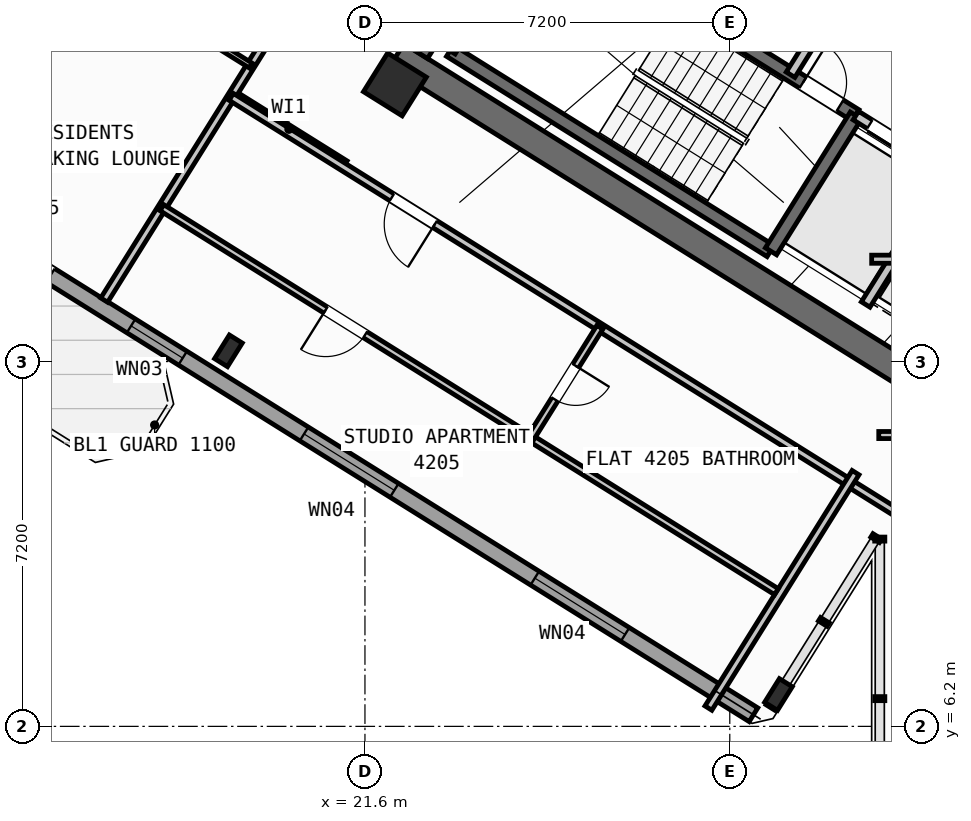
"""IFC4 building model, lengths in metres.
Left out: names, types, materials, properties, quantities, classifications, styles, units other than length and angle.
Written with IfcOpenShell. Run it as: python <this file> out.ifc"""

import sys

from ifc_helpers import new_model, si_unit, direction, frame, frame_2d, origin, origin_2d, place, context, subcontext, project, spatial, rectangle, hollow_rectangle, i_section, extrude, source, transform, mapped, element, fill, save


model = new_model("IFC4")
c1 = context("Model", 3, precision=1e-05, world=origin(), true_north=direction((0.0, 1.0)))
c2 = subcontext(c1, "Body", "Model", "MODEL_VIEW")
j1 = project(units=[si_unit("LENGTHUNIT", "METRE"), si_unit("PLANEANGLEUNIT", "RADIAN")], contexts=[c1])
p1 = place(None, origin())
s1 = spatial("IfcSite", under=j1, at=p1, CompositionType="ELEMENT")
p2 = place(p1, origin())
s2 = spatial("IfcBuilding", under=s1, at=p2, CompositionType="ELEMENT")
p3 = place(p2, frame((0.0, 0.0, 165.9)))
s3 = spatial("IfcBuildingStorey", under=s2, at=p3, CompositionType="ELEMENT", Elevation=165.9)
p4 = place(p3, frame((33.366, 12.477, 0.0), z_axis=(0.0, 0.0, 1.0), x_axis=(-0.848047359947, 0.529920442413, 0.0)))
e1 = element("IfcWall", 1, at=p4, inside=s3, PredefinedType="SHEAR", context=c2, shape_type="SweptSolid", body=[
    extrude(rectangle(XDim=13.14, YDim=0.55, at=frame_2d((6.57, 0.0))), origin(), (0.0, 0.0, 1.0), 3.32),
])
p5 = place(p3, frame((26.007, 24.976, 0.0), z_axis=(0.0, 0.0, 1.0), x_axis=(-0.529923795287, -0.848045264823, 0.0)))
e2 = element("IfcWall", 2, at=p5, inside=s3, PredefinedType="SHEAR", context=c2, shape_type="SweptSolid", body=[
    extrude(rectangle(XDim=6.425, YDim=0.55, at=frame_2d((3.212, 0.0))), origin(), (0.0, 0.0, 1.0), 3.32),
])
m1 = source(origin(), c2, "Body", "SweptSolid", [
    extrude(i_section(OverallWidth=0.3, OverallDepth=0.55, WebThickness=0.015, FlangeThickness=0.029, at=origin_2d()), origin(), (0.0, 0.0, 1.0), 3.6),
])
p6 = place(p3, frame((29.761, 6.829, 0.0), z_axis=(0.0, 0.0, 1.0), x_axis=(-0.848048096156, 0.529919264233, 0.0)))
e3 = element("IfcColumn", 3, at=p6, inside=s3, PredefinedType="COLUMN", context=c2, shape_type="MappedRepresentation", body=[
    mapped(m1, transform((0.0, 0.0, 0.0), scale=1.0)),
])
m2 = source(origin(), c2, "Body", "SweptSolid", [
    extrude(hollow_rectangle(XDim=0.9, YDim=0.9, WallThickness=0.036, at=origin_2d()), origin(), (0.0, 0.0, 1.0), 3.6),
])
p7 = place(p3, frame((22.191, 18.87, 0.0), z_axis=(0.0, 0.0, 1.0), x_axis=(-0.848048096156, 0.529919264233, 0.0)))
e4 = element("IfcColumn", 4, at=p7, inside=s3, PredefinedType="COLUMN", context=c2, shape_type="MappedRepresentation", body=[
    mapped(m2, transform((0.0, 0.0, 0.0), scale=1.0)),
])
p8 = place(p3, frame((18.906, 13.612, 0.0), z_axis=(0.0, 0.0, 1.0), x_axis=(-0.848048096156, 0.529919264233, 0.0)))
e5 = element("IfcColumn", 5, at=p8, inside=s3, PredefinedType="COLUMN", context=c2, shape_type="MappedRepresentation", body=[
    mapped(m1, transform((0.0, 0.0, 0.0), scale=1.0)),
])
p9 = place(p3, frame((29.268, 6.429, 0.0), z_axis=(0.0, 0.0, 1.0), x_axis=(-0.848049971435, 0.529916263149, 0.0)))
e6 = element("IfcWall", 6, at=p9, inside=s3, PredefinedType="STANDARD", context=c2, shape_type="SweptSolid", body=[
    extrude(rectangle(XDim=31.588, YDim=0.32, at=frame_2d((15.794, 0.0))), origin(), (0.0, 0.0, 1.0), 3.32),
])
p10 = place(p9, frame((16.362, 0.0, 0.0)))
e7 = element("IfcOpeningElement", 7, at=p10, cuts=e6, PredefinedType="OPENING", context=c2, shape_type="SweptSolid", body=[
    extrude(rectangle(XDim=1.2, YDim=2.15, at=frame_2d((0.6, 1.075))), frame((0.0, 0.17, 0.0), z_axis=(0.0, -1.0, 0.0), x_axis=(1.0, 0.0, 0.0)), (0.0, 0.0, 1.0), 0.34),
])
p11 = place(p9, frame((2.989, 0.0, 0.8)))
e8 = element("IfcOpeningElement", 8, at=p11, cuts=e6, PredefinedType="OPENING", context=c2, shape_type="SweptSolid", body=[
    extrude(rectangle(XDim=2.1, YDim=1.55, at=frame_2d((1.05, 0.775))), frame((0.0, 0.17, 0.0), z_axis=(0.0, -1.0, 0.0), x_axis=(1.0, 0.0, 0.0)), (0.0, 0.0, 1.0), 0.34),
])
p12 = place(p9, frame((8.359, 0.0, 0.8)))
e9 = element("IfcOpeningElement", 9, at=p12, cuts=e6, PredefinedType="OPENING", context=c2, shape_type="SweptSolid", body=[
    extrude(rectangle(XDim=2.1, YDim=1.55, at=frame_2d((1.05, 0.775))), frame((0.0, 0.17, 0.0), z_axis=(0.0, -1.0, 0.0), x_axis=(1.0, 0.0, 0.0)), (0.0, 0.0, 1.0), 0.34),
])
p13 = place(p9, frame((13.284, 0.0, 0.95)))
e10 = element("IfcOpeningElement", 10, at=p13, cuts=e6, PredefinedType="OPENING", context=c2, shape_type="SweptSolid", body=[
    extrude(rectangle(XDim=1.2, YDim=1.4, at=frame_2d((0.6, 0.7))), frame((0.0, 0.17, 0.0), z_axis=(0.0, -1.0, 0.0), x_axis=(1.0, 0.0, 0.0)), (0.0, 0.0, 1.0), 0.34),
])
p14 = place(p9, frame((20.39, 0.0, 0.95)))
e11 = element("IfcOpeningElement", 11, at=p14, cuts=e6, PredefinedType="OPENING", context=c2, shape_type="SweptSolid", body=[
    extrude(rectangle(XDim=1.2, YDim=1.4, at=frame_2d((0.6, 0.7))), frame((0.0, 0.17, 0.0), z_axis=(0.0, -1.0, 0.0), x_axis=(1.0, 0.0, 0.0)), (0.0, 0.0, 1.0), 0.34),
])
p15 = place(p9, frame((23.715, 0.0, 1.0)))
e12 = element("IfcOpeningElement", 12, at=p15, cuts=e6, PredefinedType="OPENING", context=c2, shape_type="SweptSolid", body=[
    extrude(rectangle(XDim=0.9, YDim=1.25, at=frame_2d((0.45, 0.625))), frame((0.0, 0.17, 0.0), z_axis=(0.0, -1.0, 0.0), x_axis=(1.0, 0.0, 0.0)), (0.0, 0.0, 1.0), 0.34),
])
p16 = place(p9, frame((26.106, 0.0, 0.85)))
e13 = element("IfcOpeningElement", 13, at=p16, cuts=e6, PredefinedType="OPENING", context=c2, shape_type="SweptSolid", body=[
    extrude(rectangle(XDim=1.5, YDim=1.5, at=frame_2d((0.75, 0.75))), frame((0.0, 0.17, 0.0), z_axis=(0.0, -1.0, 0.0), x_axis=(1.0, 0.0, 0.0)), (0.0, 0.0, 1.0), 0.34),
])
p17 = place(p9, frame((29.068, 0.0, 0.85)))
e14 = element("IfcOpeningElement", 14, at=p17, cuts=e6, PredefinedType="OPENING", context=c2, shape_type="SweptSolid", body=[
    extrude(rectangle(XDim=1.8, YDim=1.5, at=frame_2d((0.9, 0.75))), frame((0.0, 0.17, 0.0), z_axis=(0.0, -1.0, 0.0), x_axis=(1.0, 0.0, 0.0)), (0.0, 0.0, 1.0), 0.34),
])
p18 = place(p3, frame((29.605, 15.581, 0.0), z_axis=(0.0, 0.0, 1.0), x_axis=(-0.848036911448, 0.529937163087, 0.0)))
e15 = element("IfcWall", 15, at=p18, inside=s3, PredefinedType="SHEAR", context=c2, shape_type="SweptSolid", body=[
    extrude(rectangle(XDim=7.46, YDim=0.26, at=frame_2d((3.73, 0.0))), origin(), (0.0, 0.0, 1.0), 3.32),
])
p19 = place(p3, frame((31.28, 18.261, 0.0), z_axis=(0.0, 0.0, 1.0), x_axis=(-0.848051618787, 0.529913626805, 0.0)))
e16 = element("IfcWall", 16, at=p19, inside=s3, PredefinedType="SHEAR", context=c2, shape_type="SweptSolid", body=[
    extrude(rectangle(XDim=7.46, YDim=0.26, at=frame_2d((3.73, 0.0))), origin(), (0.0, 0.0, 1.0), 3.32),
])
p20 = place(p19, frame((0.36, 0.0, 0.0)))
e17 = element("IfcOpeningElement", 17, at=p20, cuts=e16, PredefinedType="OPENING", context=c2, shape_type="SweptSolid", body=[
    extrude(rectangle(XDim=0.86, YDim=2.05, at=frame_2d((0.43, 1.025))), frame((0.0, 0.14, 0.0), z_axis=(0.0, -1.0, 0.0), x_axis=(1.0, 0.0, 0.0)), (0.0, 0.0, 1.0), 0.28),
])
p21 = place(p3, frame((31.288, 18.256, 0.0), z_axis=(0.0, 0.0, 1.0), x_axis=(-0.529943379326, -0.848033026897, 0.0)))
e18 = element("IfcWall", 18, at=p21, inside=s3, PredefinedType="SHEAR", context=c2, shape_type="SweptSolid", body=[
    extrude(rectangle(XDim=3.16, YDim=0.26, at=frame_2d((1.58, 0.0))), origin(), (0.0, 0.0, 1.0), 3.32),
])
p22 = place(p3, frame((24.945, 22.22, 0.0), z_axis=(0.0, 0.0, 1.0), x_axis=(-0.529908658664, -0.84805472316, 0.0)))
e19 = element("IfcWall", 19, at=p22, inside=s3, PredefinedType="SHEAR", context=c2, shape_type="SweptSolid", body=[
    extrude(rectangle(XDim=3.16, YDim=0.26, at=frame_2d((1.58, 0.0))), origin(), (0.0, 0.0, 1.0), 3.32),
])
p23 = place(p3, frame((34.891, 16.005, 0.0), z_axis=(0.0, 0.0, 1.0), x_axis=(-0.848062873452, 0.529895614884, 0.0)))
e20 = element("IfcWall", 20, at=p23, inside=s3, PredefinedType="STANDARD", context=c2, shape_type="SweptSolid", body=[
    extrude(rectangle(XDim=4.248, YDim=0.2, at=frame_2d((2.124, 0.0))), origin(), (0.0, 0.0, 1.0), 3.31),
])
p24 = place(p23, frame((0.398, 0.0, 0.0)))
e21 = element("IfcOpeningElement", 21, at=p24, cuts=e20, PredefinedType="OPENING", context=c2, shape_type="SweptSolid", body=[
    extrude(rectangle(XDim=1.3, YDim=2.2, at=frame_2d((0.65, 1.1))), frame((0.0, 0.11, 0.0), z_axis=(0.0, -1.0, 0.0), x_axis=(1.0, 0.0, 0.0)), (0.0, 0.0, 1.0), 0.22),
])
p25 = place(p23, frame((2.473, 0.0, 0.0)))
e22 = element("IfcOpeningElement", 22, at=p25, cuts=e20, PredefinedType="OPENING", context=c2, shape_type="SweptSolid", body=[
    extrude(rectangle(XDim=1.45, YDim=2.25, at=frame_2d((0.725, 1.125))), frame((0.0, 0.11, 0.0), z_axis=(0.0, -1.0, 0.0), x_axis=(1.0, 0.0, 0.0)), (0.0, 0.0, 1.0), 0.22),
])
p26 = place(p3, frame((36.417, 18.447, 0.0), z_axis=(0.0, 0.0, 1.0), x_axis=(-0.848064879198, 0.529892404805, 0.0)))
e23 = element("IfcWall", 23, at=p26, inside=s3, PredefinedType="STANDARD", context=c2, shape_type="SweptSolid", body=[
    extrude(rectangle(XDim=5.768, YDim=0.2, at=frame_2d((2.884, 0.0))), origin(), (0.0, 0.0, 1.0), 3.31),
])
p27 = place(p26, frame((2.548, 0.0, 0.0)))
e24 = element("IfcOpeningElement", 24, at=p27, cuts=e23, PredefinedType="OPENING", context=c2, shape_type="SweptSolid", body=[
    extrude(rectangle(XDim=1.15, YDim=2.1, at=frame_2d((0.575, 1.05))), frame((0.0, 0.11, 0.0), z_axis=(0.0, -1.0, 0.0), x_axis=(1.0, 0.0, 0.0)), (0.0, 0.0, 1.0), 0.22),
])
p28 = place(p3, frame((33.029, 17.003, 0.0), z_axis=(0.0, 0.0, 1.0), x_axis=(-0.529916267533, -0.848049968695, 0.0)))
e25 = element("IfcWall", 25, at=p28, inside=s3, PredefinedType="STANDARD", context=c2, shape_type="SweptSolid", body=[
    extrude(rectangle(XDim=2.92, YDim=0.2, at=frame_2d((1.46, 0.0))), origin(), (0.0, 0.0, 1.0), 3.31),
])
p29 = place(p3, frame((31.525, 21.504, 0.0), z_axis=(0.0, 0.0, 1.0), x_axis=(-0.529907497854, -0.848055448493, 0.0)))
e26 = element("IfcWall", 26, at=p29, inside=s3, PredefinedType="STANDARD", context=c2, shape_type="SweptSolid", body=[
    extrude(rectangle(XDim=2.88, YDim=0.2, at=frame_2d((1.44, 0.0))), origin(), (0.0, 0.0, 1.0), 3.31),
])
p30 = place(p3, frame((21.206, 17.292, 0.0), z_axis=(0.0, 0.0, 1.0), x_axis=(-0.848050851465, 0.529914854792, 0.0)))
e27 = element("IfcWall", 27, at=p30, inside=s3, PredefinedType="PARTITIONING", context=c2, shape_type="SweptSolid", body=[
    extrude(rectangle(XDim=2.61, YDim=0.16, at=frame_2d((1.305, 0.0))), origin(), (0.0, 0.0, 1.0), 3.31),
])
p31 = place(p3, frame((23.899, 26.529, 0.0), z_axis=(0.0, 0.0, 1.0), x_axis=(-0.529917716469, -0.848049063305, 0.0)))
e28 = element("IfcWall", 28, at=p31, inside=s3, PredefinedType="PARTITIONING", context=c2, shape_type="SweptSolid", body=[
    extrude(rectangle(XDim=14.05, YDim=0.16, at=frame_2d((7.025, 0.0))), origin(), (0.0, 0.0, 1.0), 3.31),
])
p32 = place(p3, frame((16.519, 21.87, 0.0), z_axis=(0.0, 0.0, 1.0), x_axis=(-0.529922447305, -0.848046107144, 0.0)))
e29 = element("IfcWall", 29, at=p32, inside=s3, PredefinedType="PARTITIONING", context=c2, shape_type="SweptSolid", body=[
    extrude(rectangle(XDim=5.451, YDim=0.16, at=frame_2d((2.726, 0.0))), origin(), (0.0, 0.0, 1.0), 2.795),
])
p33 = place(p3, frame((19.346, 19.242, 0.0), z_axis=(0.0, 0.0, 1.0), x_axis=(-0.848059820872, 0.529900500304, 0.0)))
e30 = element("IfcWall", 30, at=p33, inside=s3, PredefinedType="PARTITIONING", context=c2, shape_type="SweptSolid", body=[
    extrude(rectangle(XDim=3.79, YDim=0.11, at=frame_2d((1.895, 0.0))), origin(), (0.0, 0.0, 1.0), 3.31),
])
p34 = place(p33, frame((1.435, 0.0, 0.0)))
e31 = element("IfcOpeningElement", 31, at=p34, cuts=e30, PredefinedType="OPENING", context=c2, shape_type="SweptSolid", body=[
    extrude(rectangle(XDim=0.92, YDim=2.08, at=frame_2d((0.46, 1.04))), frame((0.0, 0.065, 0.0), z_axis=(0.0, -1.0, 0.0), x_axis=(1.0, 0.0, 0.0)), (0.0, 0.0, 1.0), 0.13),
])
p35 = place(p3, frame((15.953, 28.452, 0.0), z_axis=(0.0, 0.0, 1.0), x_axis=(-0.529931645041, -0.848040359643, 0.0)))
e32 = element("IfcWall", 32, at=p35, inside=s3, PredefinedType="PARTITIONING", context=c2, shape_type="SweptSolid", body=[
    extrude(rectangle(XDim=11.74, YDim=0.11, at=frame_2d((5.87, 0.0))), origin(), (0.0, 0.0, 1.0), 3.31),
])
p36 = place(p35, frame((0.35, 0.0, 0.0)))
e33 = element("IfcOpeningElement", 33, at=p36, cuts=e32, PredefinedType="OPENING", context=c2, shape_type="SweptSolid", body=[
    extrude(rectangle(XDim=0.92, YDim=2.08, at=frame_2d((0.46, 1.04))), frame((0.0, 0.065, 0.0), z_axis=(0.0, -1.0, 0.0), x_axis=(1.0, 0.0, 0.0)), (0.0, 0.0, 1.0), 0.13),
])
p37 = place(p3, frame((32.164, 10.374, 0.0), z_axis=(0.0, 0.0, 1.0), x_axis=(-0.848044107957, 0.529925646633, 0.0)))
e34 = element("IfcWall", 34, at=p37, inside=s3, PredefinedType="PARTITIONING", context=c2, shape_type="SweptSolid", body=[
    extrude(rectangle(XDim=15.57, YDim=0.16, at=frame_2d((7.785, 0.0))), origin(), (0.0, 0.0, 1.0), 3.31),
])
p38 = place(p37, frame((10.83, 0.0, 0.0)))
e35 = element("IfcOpeningElement", 35, at=p38, cuts=e34, PredefinedType="OPENING", context=c2, shape_type="SweptSolid", body=[
    extrude(rectangle(XDim=1.0, YDim=2.1, at=frame_2d((0.5, 1.05))), frame((0.0, 0.09, 0.0), z_axis=(0.0, -1.0, 0.0), x_axis=(1.0, 0.0, 0.0)), (0.0, 0.0, 1.0), 0.18),
])
p39 = place(p3, frame((31.282, 11.208, 0.0), z_axis=(0.0, 0.0, 1.0), x_axis=(-0.529938869374, -0.84803584519, 0.0)))
e36 = element("IfcWall", 36, at=p39, inside=s3, PredefinedType="PARTITIONING", context=c2, shape_type="SweptSolid", body=[
    extrude(rectangle(XDim=5.48, YDim=0.16, at=frame_2d((2.74, 0.0))), origin(), (0.0, 0.0, 1.0), 3.31),
])
p40 = place(p3, frame((29.72, 8.859, 0.0), z_axis=(0.0, 0.0, 1.0), x_axis=(-0.848049134363, 0.529917602752, 0.0)))
e37 = element("IfcWall", 37, at=p40, inside=s3, PredefinedType="PLUMBINGWALL", context=c2, shape_type="SweptSolid", body=[
    extrude(rectangle(XDim=14.3, YDim=0.14, at=frame_2d((7.15, 0.0))), origin(), (0.0, 0.0, 1.0), 3.31),
])
p41 = place(p40, frame((9.57, 0.0, 0.0)))
e38 = element("IfcOpeningElement", 38, at=p41, cuts=e37, PredefinedType="OPENING", context=c2, shape_type="SweptSolid", body=[
    extrude(rectangle(XDim=0.92, YDim=2.08, at=frame_2d((0.46, 1.04))), frame((0.0, 0.08, 0.0), z_axis=(0.0, -1.0, 0.0), x_axis=(1.0, 0.0, 0.0)), (0.0, 0.0, 1.0), 0.16),
])
p42 = place(p3, frame((26.237, 14.078, 0.0), z_axis=(0.0, 0.0, 1.0), x_axis=(-0.52995640672, -0.848024885824, 0.0)))
e39 = element("IfcWall", 39, at=p42, inside=s3, PredefinedType="PLUMBINGWALL", context=c2, shape_type="SweptSolid", body=[
    extrude(rectangle(XDim=2.58, YDim=0.14, at=frame_2d((1.29, 0.0))), origin(), (0.0, 0.0, 1.0), 3.31),
])
p43 = place(p42, frame((0.9, 0.0, 0.0)))
e40 = element("IfcOpeningElement", 40, at=p43, cuts=e39, PredefinedType="OPENING", context=c2, shape_type="SweptSolid", body=[
    extrude(rectangle(XDim=0.78, YDim=2.05, at=frame_2d((0.39, 1.025))), frame((0.0, 0.08, 0.0), z_axis=(0.0, -1.0, 0.0), x_axis=(1.0, 0.0, 0.0)), (0.0, 0.0, 1.0), 0.16),
])
p44 = place(p3, frame((31.6, 15.42, 0.0), z_axis=(0.0, 0.0, 1.0), x_axis=(1.0, 0.0, 0.0)))
e41 = element("IfcWall", 41, at=p44, inside=s3, PredefinedType="PARTITIONING", context=c2, shape_type="SweptSolid", body=[
    extrude(rectangle(XDim=2.925, YDim=0.16, at=frame_2d((1.462, 0.0))), origin(), (0.0, 0.0, 1.0), 3.31),
])
p45 = place(p3, frame((31.74, 11.95, 0.0), z_axis=(0.0, 0.0, 1.0), x_axis=(1.0, 0.0, 0.0)))
e42 = element("IfcWall", 42, at=p45, inside=s3, PredefinedType="PLUMBINGWALL", context=c2, shape_type="SweptSolid", body=[
    extrude(rectangle(XDim=0.676, YDim=0.14, at=frame_2d((0.338, 0.0))), origin(), (0.0, 0.0, 1.0), 3.31),
])
m3 = source(origin(), c2, "Body", "SweptSolid", [
    extrude(rectangle(XDim=2.1, YDim=1.55, at=frame_2d((1.05, 0.775))), frame((0.0, 0.03, 0.0), z_axis=(0.0, -1.0, 0.0), x_axis=(1.0, 0.0, 0.0)), (0.0, 0.0, 1.0), 0.06),
])
p46 = place(p11, origin())
e43 = element("IfcWindow", 43, at=p46, inside=s3, PartitioningType="SINGLE_PANEL", PredefinedType="WINDOW", context=c2, shape_type="MappedRepresentation", body=[
    mapped(m3, transform((0.0, 0.0, 0.0), scale=1.0)),
])
fill(e8, e43)
p47 = place(p12, origin())
e44 = element("IfcWindow", 44, at=p47, inside=s3, PartitioningType="SINGLE_PANEL", PredefinedType="WINDOW", context=c2, shape_type="MappedRepresentation", body=[
    mapped(m3, transform((0.0, 0.0, 0.0), scale=1.0)),
])
fill(e9, e44)
m4 = source(origin(), c2, "Body", "SweptSolid", [
    extrude(rectangle(XDim=1.2, YDim=1.4, at=frame_2d((0.6, 0.7))), frame((0.0, 0.03, 0.0), z_axis=(0.0, -1.0, 0.0), x_axis=(1.0, 0.0, 0.0)), (0.0, 0.0, 1.0), 0.06),
])
p48 = place(p13, origin())
e45 = element("IfcWindow", 45, at=p48, inside=s3, PartitioningType="SINGLE_PANEL", PredefinedType="WINDOW", context=c2, shape_type="MappedRepresentation", body=[
    mapped(m4, transform((0.0, 0.0, 0.0), scale=1.0)),
])
fill(e10, e45)
m5 = source(origin(), c2, "Body", "SweptSolid", [
    extrude(rectangle(XDim=0.86, YDim=2.05, at=frame_2d((0.43, 1.025))), frame((0.0, 0.025, 0.0), z_axis=(0.0, -1.0, 0.0), x_axis=(1.0, 0.0, 0.0)), (0.0, 0.0, 1.0), 0.05),
])
p49 = place(p20, frame((0.86, 0.0, 0.0), z_axis=(0.0, 0.0, 1.0), x_axis=(-1.0, 0.0, 0.0)))
e46 = element("IfcDoor", 46, at=p49, inside=s3, OperationType="SINGLE_SWING_LEFT", PredefinedType="DOOR", context=c2, shape_type="MappedRepresentation", body=[
    mapped(m5, transform((0.0, 0.0, 0.0), scale=1.0)),
])
fill(e17, e46)
m6 = source(origin(), c2, "Body", "SweptSolid", [
    extrude(rectangle(XDim=1.45, YDim=2.25, at=frame_2d((0.725, 1.125))), frame((0.0, 0.025, 0.0), z_axis=(0.0, -1.0, 0.0), x_axis=(1.0, 0.0, 0.0)), (0.0, 0.0, 1.0), 0.05),
])
p50 = place(p25, origin())
e47 = element("IfcDoor", 47, at=p50, inside=s3, OperationType="DOUBLE_DOOR_SLIDING", PredefinedType="DOOR", context=c2, shape_type="MappedRepresentation", body=[
    mapped(m6, transform((0.0, 0.0, 0.0), scale=1.0)),
])
fill(e22, e47)
m7 = source(origin(), c2, "Body", "SweptSolid", [
    extrude(rectangle(XDim=1.0, YDim=2.1, at=frame_2d((0.5, 1.05))), frame((0.0, 0.025, 0.0), z_axis=(0.0, -1.0, 0.0), x_axis=(1.0, 0.0, 0.0)), (0.0, 0.0, 1.0), 0.05),
])
p51 = place(p38, origin())
e48 = element("IfcDoor", 48, at=p51, inside=s3, OperationType="SINGLE_SWING_LEFT", PredefinedType="DOOR", context=c2, shape_type="MappedRepresentation", body=[
    mapped(m7, transform((0.0, 0.0, 0.0), scale=1.0)),
])
fill(e35, e48)
m8 = source(origin(), c2, "Body", "SweptSolid", [
    extrude(rectangle(XDim=0.92, YDim=2.08, at=frame_2d((0.46, 1.04))), frame((0.0, 0.025, 0.0), z_axis=(0.0, -1.0, 0.0), x_axis=(1.0, 0.0, 0.0)), (0.0, 0.0, 1.0), 0.05),
])
p52 = place(p41, origin())
e49 = element("IfcDoor", 49, at=p52, inside=s3, OperationType="SINGLE_SWING_RIGHT", PredefinedType="DOOR", context=c2, shape_type="MappedRepresentation", body=[
    mapped(m8, transform((0.0, 0.0, 0.0), scale=1.0)),
])
fill(e38, e49)
m9 = source(origin(), c2, "Body", "SweptSolid", [
    extrude(rectangle(XDim=0.78, YDim=2.05, at=frame_2d((0.39, 1.025))), frame((0.0, 0.025, 0.0), z_axis=(0.0, -1.0, 0.0), x_axis=(1.0, 0.0, 0.0)), (0.0, 0.0, 1.0), 0.05),
])
p53 = place(p43, origin())
e50 = element("IfcDoor", 50, at=p53, inside=s3, OperationType="SINGLE_SWING_LEFT", PredefinedType="DOOR", context=c2, shape_type="MappedRepresentation", body=[
    mapped(m9, transform((0.0, 0.0, 0.0), scale=1.0)),
])
fill(e40, e50)
save(model, sys.argv[1])
